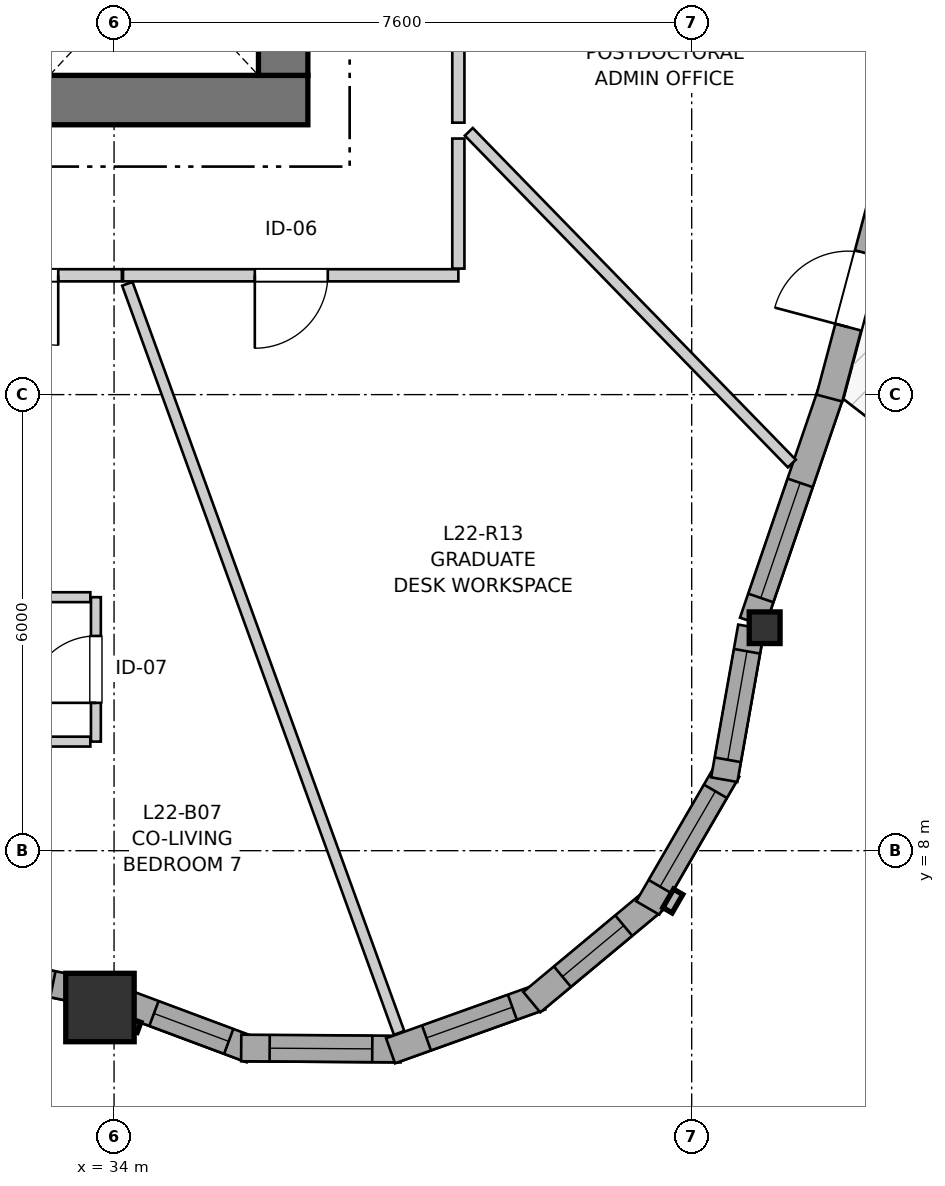
"""IFC4 building model, lengths in metres.
Left out: names, types, materials, properties, quantities, classifications, styles, units other than length and angle.
Written with IfcOpenShell. Run it as: python <this file> out.ifc"""

import sys

from ifc_helpers import new_model, si_unit, direction, frame, frame_2d, origin, origin_2d, place, context, subcontext, project, spatial, rectangle, i_section, extrude, source, transform, mapped, element, fill, save


model = new_model("IFC4")
c1 = context("Model", 3, precision=1e-05, world=origin(), true_north=direction((0.0, 1.0)))
c2 = subcontext(c1, "Body", "Model", "MODEL_VIEW")
j1 = project(units=[si_unit("LENGTHUNIT", "METRE"), si_unit("PLANEANGLEUNIT", "RADIAN")], contexts=[c1])
p1 = place(None, origin())
s1 = spatial("IfcSite", under=j1, at=p1, CompositionType="ELEMENT")
p2 = place(p1, origin())
s2 = spatial("IfcBuilding", under=s1, at=p2, CompositionType="ELEMENT")
p3 = place(p2, frame((0.0, 0.0, 76.8)))
s3 = spatial("IfcBuildingStorey", under=s2, at=p3, CompositionType="ELEMENT", Elevation=76.8)
p4 = place(p3, frame((24.15, 17.875, 0.0), z_axis=(0.0, 0.0, 1.0), x_axis=(1.0, 0.0, 0.0)))
e1 = element("IfcWall", 1, at=p4, inside=s3, PredefinedType="SHEAR", context=c2, shape_type="SweptSolid", body=[
    extrude(rectangle(XDim=12.4, YDim=0.65, at=frame_2d((6.2, 0.0))), origin(), (0.0, 0.0, 1.0), 2.935),
])
p5 = place(p3, frame((36.225, 18.2, 0.0), z_axis=(0.0, 0.0, 1.0), x_axis=(0.0, 1.0, 0.0)))
e2 = element("IfcWall", 2, at=p5, inside=s3, PredefinedType="SHEAR", context=c2, shape_type="SweptSolid", body=[
    extrude(rectangle(XDim=15.6, YDim=0.65, at=frame_2d((7.8, 0.0))), origin(), (0.0, 0.0, 1.0), 2.935),
])
p6 = place(p5, frame((4.25, 0.0, 0.0)))
e3 = element("IfcOpeningElement", 3, at=p6, cuts=e2, PredefinedType="OPENING", context=c2, shape_type="SweptSolid", body=[
    extrude(rectangle(XDim=1.1, YDim=2.15, at=frame_2d((0.55, 1.075))), frame((0.0, 0.335, 0.0), z_axis=(0.0, -1.0, 0.0), x_axis=(1.0, 0.0, 0.0)), (0.0, 0.0, 1.0), 0.67),
])
p7 = place(p5, frame((10.25, 0.0, 0.0)))
e4 = element("IfcOpeningElement", 4, at=p7, cuts=e2, PredefinedType="OPENING", context=c2, shape_type="SweptSolid", body=[
    extrude(rectangle(XDim=1.1, YDim=2.15, at=frame_2d((0.55, 1.075))), frame((0.0, 0.335, 0.0), z_axis=(0.0, -1.0, 0.0), x_axis=(1.0, 0.0, 0.0)), (0.0, 0.0, 1.0), 0.67),
])
m1 = source(origin(), c2, "Body", "SweptSolid", [
    extrude(rectangle(XDim=0.9, YDim=0.9, at=origin_2d()), origin(), (0.0, 0.0, 1.0), 2.935),
])
p8 = place(p3, frame((33.815, 5.937, 0.0), z_axis=(0.0, 0.0, 1.0), x_axis=(1.0, 0.0, 0.0)))
e5 = element("IfcColumn", 5, at=p8, inside=s3, PredefinedType="COLUMN", context=c2, shape_type="MappedRepresentation", body=[
    mapped(m1, transform((0.0, 0.0, 0.0), x_axis=(1.0, 0.0, 0.0), y_axis=(0.0, 1.0, 0.0), z_axis=(0.0, 0.0, 1.0), scale=1.0)),
])
m2 = source(origin(), c2, "Body", "SweptSolid", [
    extrude(i_section(OverallWidth=0.406, OverallDepth=0.416, WebThickness=0.027, FlangeThickness=0.044, FilletRadius=0.015, at=origin_2d()), origin(), (0.0, 0.0, 1.0), 2.935),
])
p9 = place(p3, frame((42.56, 10.933, 0.0), z_axis=(0.0, 0.0, 1.0), x_axis=(1.0, 0.0, 0.0)))
e6 = element("IfcColumn", 6, at=p9, inside=s3, PredefinedType="PILASTER", context=c2, shape_type="MappedRepresentation", body=[
    mapped(m2, transform((0.0, 0.0, 0.0), x_axis=(1.0, 0.0, 0.0), y_axis=(0.0, 1.0, 0.0), z_axis=(0.0, 0.0, 1.0), scale=1.0)),
])
p10 = place(p3, frame((30.741, 6.748, 0.0), z_axis=(0.0, 0.0, 1.0), x_axis=(0.979446941056, -0.201701982282, 0.0)))
e7 = element("IfcWall", 7, at=p10, inside=s3, PredefinedType="SOLIDWALL", context=c2, shape_type="SweptSolid", body=[
    extrude(rectangle(XDim=2.948, YDim=0.35, at=frame_2d((1.474, 0.0))), origin(), (0.0, 0.0, 1.0), 2.465),
])
p11 = place(p10, frame((0.27, 0.0, 0.82)))
e8 = element("IfcOpeningElement", 8, at=p11, cuts=e7, PredefinedType="OPENING", context=c2, shape_type="SweptSolid", body=[
    extrude(rectangle(XDim=1.25, YDim=1.35, at=frame_2d((0.625, 0.675))), frame((0.0, 0.185, 0.0), z_axis=(0.0, -1.0, 0.0), x_axis=(1.0, 0.0, 0.0)), (0.0, 0.0, 1.0), 0.37),
])
p12 = place(p10, frame((1.925, 0.0, 0.82)))
e9 = element("IfcOpeningElement", 9, at=p12, cuts=e7, PredefinedType="OPENING", context=c2, shape_type="SweptSolid", body=[
    extrude(rectangle(XDim=0.58, YDim=1.35, at=frame_2d((0.29, 0.675))), frame((0.0, 0.185, 0.0), z_axis=(0.0, -1.0, 0.0), x_axis=(1.0, 0.0, 0.0)), (0.0, 0.0, 1.0), 0.37),
])
p13 = place(p3, frame((34.087, 6.022, 0.0), z_axis=(0.0, 0.0, 1.0), x_axis=(0.9368310555, -0.349782180007, 0.0)))
e10 = element("IfcWall", 10, at=p13, inside=s3, PredefinedType="SOLIDWALL", context=c2, shape_type="SweptSolid", body=[
    extrude(rectangle(XDim=1.836, YDim=0.35, at=frame_2d((0.918, 0.0))), origin(), (0.0, 0.0, 1.0), 2.465),
])
p14 = place(p13, frame((0.468, 0.0, 0.82)))
e11 = element("IfcOpeningElement", 11, at=p14, cuts=e10, PredefinedType="OPENING", context=c2, shape_type="SweptSolid", body=[
    extrude(rectangle(XDim=1.05, YDim=1.45, at=frame_2d((0.525, 0.725))), frame((0.0, 0.185, 0.0), z_axis=(0.0, -1.0, 0.0), x_axis=(1.0, 0.0, 0.0)), (0.0, 0.0, 1.0), 0.37),
])
p15 = place(p3, frame((35.673, 5.404, 0.0), z_axis=(0.0, 0.0, 1.0), x_axis=(0.999976451414, -0.006862697526, 0.0)))
e12 = element("IfcWall", 12, at=p15, inside=s3, PredefinedType="SOLIDWALL", context=c2, shape_type="SweptSolid", body=[
    extrude(rectangle(XDim=2.099, YDim=0.35, at=frame_2d((1.049, 0.0))), origin(), (0.0, 0.0, 1.0), 2.465),
])
p16 = place(p15, frame((0.375, 0.0, 0.82)))
e13 = element("IfcOpeningElement", 13, at=p16, cuts=e12, PredefinedType="OPENING", context=c2, shape_type="SweptSolid", body=[
    extrude(rectangle(XDim=1.35, YDim=1.45, at=frame_2d((0.675, 0.725))), frame((0.0, 0.185, 0.0), z_axis=(0.0, -1.0, 0.0), x_axis=(1.0, 0.0, 0.0)), (0.0, 0.0, 1.0), 0.37),
])
p17 = place(p3, frame((37.638, 5.367, 0.0), z_axis=(0.0, 0.0, 1.0), x_axis=(0.941486401639, 0.33705096874, 0.0)))
e14 = element("IfcWall", 14, at=p17, inside=s3, PredefinedType="SOLIDWALL", context=c2, shape_type="SweptSolid", body=[
    extrude(rectangle(XDim=2.099, YDim=0.35, at=frame_2d((1.05, 0.0))), origin(), (0.0, 0.0, 1.0), 2.465),
])
p18 = place(p17, frame((0.502, 0.0, 0.82)))
e15 = element("IfcOpeningElement", 15, at=p18, cuts=e14, PredefinedType="OPENING", context=c2, shape_type="SweptSolid", body=[
    extrude(rectangle(XDim=1.2, YDim=1.45, at=frame_2d((0.6, 0.725))), frame((0.0, 0.185, 0.0), z_axis=(0.0, -1.0, 0.0), x_axis=(1.0, 0.0, 0.0)), (0.0, 0.0, 1.0), 0.37),
])
p19 = place(p3, frame((39.496, 6.007, 0.0), z_axis=(0.0, 0.0, 1.0), x_axis=(0.768450068703, 0.639909752942, 0.0)))
e16 = element("IfcWall", 16, at=p19, inside=s3, PredefinedType="SOLIDWALL", context=c2, shape_type="SweptSolid", body=[
    extrude(rectangle(XDim=2.099, YDim=0.35, at=frame_2d((1.049, 0.0))), origin(), (0.0, 0.0, 1.0), 2.465),
])
p20 = place(p19, frame((0.524, 0.0, 0.82)))
e17 = element("IfcOpeningElement", 17, at=p20, cuts=e16, PredefinedType="OPENING", context=c2, shape_type="SweptSolid", body=[
    extrude(rectangle(XDim=1.05, YDim=1.45, at=frame_2d((0.525, 0.725))), frame((0.0, 0.185, 0.0), z_axis=(0.0, -1.0, 0.0), x_axis=(1.0, 0.0, 0.0)), (0.0, 0.0, 1.0), 0.37),
])
p21 = place(p3, frame((41.021, 7.247, 0.0), z_axis=(0.0, 0.0, 1.0), x_axis=(0.501902596059, 0.864924149315, 0.0)))
e18 = element("IfcWall", 18, at=p21, inside=s3, PredefinedType="SOLIDWALL", context=c2, shape_type="SweptSolid", body=[
    extrude(rectangle(XDim=2.099, YDim=0.35, at=frame_2d((1.049, 0.0))), origin(), (0.0, 0.0, 1.0), 2.465),
])
p22 = place(p21, frame((0.324, 0.0, 0.82)))
e19 = element("IfcOpeningElement", 19, at=p22, cuts=e18, PredefinedType="OPENING", context=c2, shape_type="SweptSolid", body=[
    extrude(rectangle(XDim=1.45, YDim=1.25, at=frame_2d((0.725, 0.625))), frame((0.0, 0.185, 0.0), z_axis=(0.0, -1.0, 0.0), x_axis=(1.0, 0.0, 0.0)), (0.0, 0.0, 1.0), 0.37),
])
p23 = place(p3, frame((42.028, 8.934, 0.0), z_axis=(0.0, 0.0, 1.0), x_axis=(0.174399433509, 0.984674990843, 0.0)))
e20 = element("IfcWall", 20, at=p23, inside=s3, PredefinedType="SOLIDWALL", context=c2, shape_type="SweptSolid", body=[
    extrude(rectangle(XDim=2.041, YDim=0.35, at=frame_2d((1.021, 0.0))), origin(), (0.0, 0.0, 1.0), 2.465),
])
p24 = place(p23, frame((0.265, 0.0, 0.82)))
e21 = element("IfcOpeningElement", 21, at=p24, cuts=e20, PredefinedType="OPENING", context=c2, shape_type="SweptSolid", body=[
    extrude(rectangle(XDim=1.45, YDim=1.25, at=frame_2d((0.725, 0.625))), frame((0.0, 0.185, 0.0), z_axis=(0.0, -1.0, 0.0), x_axis=(1.0, 0.0, 0.0)), (0.0, 0.0, 1.0), 0.37),
])
p25 = place(p3, frame((42.401, 11.009, 0.0), z_axis=(0.0, 0.0, 1.0), x_axis=(0.323605065536, 0.946192243447, 0.0)))
e22 = element("IfcWall", 22, at=p25, inside=s3, PredefinedType="SOLIDWALL", context=c2, shape_type="SweptSolid", body=[
    extrude(rectangle(XDim=3.203, YDim=0.35, at=frame_2d((1.601, 0.0))), origin(), (0.0, 0.0, 1.0), 2.465),
])
p26 = place(p25, frame((0.334, 0.0, 0.82)))
e23 = element("IfcOpeningElement", 23, at=p26, cuts=e22, PredefinedType="OPENING", context=c2, shape_type="SweptSolid", body=[
    extrude(rectangle(XDim=1.6, YDim=1.35, at=frame_2d((0.8, 0.675))), frame((0.0, 0.185, 0.0), z_axis=(0.0, -1.0, 0.0), x_axis=(1.0, 0.0, 0.0)), (0.0, 0.0, 1.0), 0.37),
])
p27 = place(p3, frame((43.412, 13.955, 0.0), z_axis=(0.0, 0.0, 1.0), x_axis=(0.257050841376, 0.966397881283, 0.0)))
e24 = element("IfcWall", 24, at=p27, inside=s3, PredefinedType="SOLIDWALL", context=c2, shape_type="SweptSolid", body=[
    extrude(rectangle(XDim=2.931, YDim=0.35, at=frame_2d((1.465, 0.0))), origin(), (0.0, 0.0, 1.0), 2.465),
])
p28 = place(p27, frame((0.966, 0.0, 0.0)))
e25 = element("IfcOpeningElement", 25, at=p28, cuts=e24, PredefinedType="OPENING", context=c2, shape_type="SweptSolid", body=[
    extrude(rectangle(XDim=1.0, YDim=2.1, at=frame_2d((0.5, 1.05))), frame((0.0, 0.185, 0.0), z_axis=(0.0, -1.0, 0.0), x_axis=(1.0, 0.0, 0.0)), (0.0, 0.0, 1.0), 0.37),
])
p29 = place(p3, frame((38.53, 24.781, 0.0), z_axis=(0.0, 0.0, 1.0), x_axis=(0.0, -1.0, 0.0)))
e26 = element("IfcWall", 26, at=p29, inside=s3, PredefinedType="PARTITIONING", context=c2, shape_type="SweptSolid", body=[
    extrude(rectangle(XDim=7.203, YDim=0.16, at=frame_2d((3.602, 0.0))), origin(), (0.0, 0.0, 1.0), 2.935),
])
p30 = place(p29, frame((3.119, 0.0, 0.0)))
e27 = element("IfcOpeningElement", 27, at=p30, cuts=e26, PredefinedType="OPENING", context=c2, shape_type="SweptSolid", body=[
    extrude(rectangle(XDim=0.96, YDim=2.1, at=frame_2d((0.48, 1.05))), frame((0.0, 0.09, 0.0), z_axis=(0.0, -1.0, 0.0), x_axis=(1.0, 0.0, 0.0)), (0.0, 0.0, 1.0), 0.18),
])
p31 = place(p3, frame((38.53, 15.57, 0.0), z_axis=(0.0, 0.0, 1.0), x_axis=(-1.0, 0.0, 0.0)))
e28 = element("IfcWall", 28, at=p31, inside=s3, PredefinedType="PARTITIONING", context=c2, shape_type="SweptSolid", body=[
    extrude(rectangle(XDim=4.412, YDim=0.16, at=frame_2d((2.206, 0.0))), origin(), (0.0, 0.0, 1.0), 2.935),
])
p32 = place(p31, frame((1.718, 0.0, 0.0)))
e29 = element("IfcOpeningElement", 29, at=p32, cuts=e28, PredefinedType="OPENING", context=c2, shape_type="SweptSolid", body=[
    extrude(rectangle(XDim=0.96, YDim=2.1, at=frame_2d((0.48, 1.05))), frame((0.0, 0.09, 0.0), z_axis=(0.0, -1.0, 0.0), x_axis=(1.0, 0.0, 0.0)), (0.0, 0.0, 1.0), 0.18),
])
p33 = place(p3, frame((34.103, 15.57, 0.0), z_axis=(0.0, 0.0, 1.0), x_axis=(-1.0, 0.0, 0.0)))
e30 = element("IfcWall", 30, at=p33, inside=s3, PredefinedType="PARTITIONING", context=c2, shape_type="SweptSolid", body=[
    extrude(rectangle(XDim=2.596, YDim=0.16, at=frame_2d((1.298, 0.0))), origin(), (0.0, 0.0, 1.0), 2.935),
])
p34 = place(p33, frame((0.837, 0.0, 0.0)))
e31 = element("IfcOpeningElement", 31, at=p34, cuts=e30, PredefinedType="OPENING", context=c2, shape_type="SweptSolid", body=[
    extrude(rectangle(XDim=0.92, YDim=2.1, at=frame_2d((0.46, 1.05))), frame((0.0, 0.09, 0.0), z_axis=(0.0, -1.0, 0.0), x_axis=(1.0, 0.0, 0.0)), (0.0, 0.0, 1.0), 0.18),
])
p35 = place(p3, frame((33.761, 9.435, 0.0), z_axis=(0.0, 0.0, 1.0), x_axis=(0.0, 1.0, 0.0)))
e32 = element("IfcWall", 32, at=p35, inside=s3, PredefinedType="PARTITIONING", context=c2, shape_type="SweptSolid", body=[
    extrude(rectangle(XDim=1.9, YDim=0.13, at=frame_2d((0.95, 0.0))), origin(), (0.0, 0.0, 1.0), 2.935),
])
p36 = place(p35, frame((0.51, 0.0, 0.0)))
e33 = element("IfcOpeningElement", 33, at=p36, cuts=e32, PredefinedType="OPENING", context=c2, shape_type="SweptSolid", body=[
    extrude(rectangle(XDim=0.88, YDim=2.05, at=frame_2d((0.44, 1.025))), frame((0.0, 0.075, 0.0), z_axis=(0.0, -1.0, 0.0), x_axis=(1.0, 0.0, 0.0)), (0.0, 0.0, 1.0), 0.15),
])
p37 = place(p3, frame((34.175, 15.458, 0.0), z_axis=(0.0, 0.0, 1.0), x_axis=(0.341079223998, -0.940034554129, 0.0)))
e34 = element("IfcWall", 34, at=p37, inside=s3, PredefinedType="PARTITIONING", context=c2, shape_type="SweptSolid", body=[
    extrude(rectangle(XDim=10.484, YDim=0.145, at=frame_2d((5.242, 0.0))), origin(), (0.0, 0.0, 1.0), 2.935),
])
p38 = place(p3, frame((38.667, 17.458, 0.0), z_axis=(0.0, 0.0, 1.0), x_axis=(0.697626427609, -0.716461699954, 0.0)))
e35 = element("IfcWall", 35, at=p38, inside=s3, PredefinedType="PARTITIONING", context=c2, shape_type="SweptSolid", body=[
    extrude(rectangle(XDim=6.092, YDim=0.145, at=frame_2d((3.046, 0.0))), origin(), (0.0, 0.0, 1.0), 2.935),
])
p39 = place(p3, frame((38.53, 15.658, 0.0), z_axis=(0.0, 0.0, 1.0), x_axis=(0.0, 1.0, 0.0)))
e36 = element("IfcWall", 36, at=p39, inside=s3, PredefinedType="PARTITIONING", context=c2, shape_type="SweptSolid", body=[
    extrude(rectangle(XDim=1.711, YDim=0.16, at=frame_2d((0.855, 0.0))), origin(), (0.0, 0.0, 1.0), 2.935),
])
p40 = place(p3, frame((32.049, 11.335, 0.0), z_axis=(0.0, 0.0, 1.0), x_axis=(1.0, 0.0, 0.0)))
e37 = element("IfcWall", 37, at=p40, inside=s3, PredefinedType="PARTITIONING", context=c2, shape_type="SweptSolid", body=[
    extrude(rectangle(XDim=1.639, YDim=0.13, at=frame_2d((0.82, 0.0))), origin(), (0.0, 0.0, 1.0), 2.935),
])
p41 = place(p3, frame((32.228, 9.435, 0.0), z_axis=(0.0, 0.0, 1.0), x_axis=(1.0, 0.0, 0.0)))
e38 = element("IfcWall", 38, at=p41, inside=s3, PredefinedType="PARTITIONING", context=c2, shape_type="SweptSolid", body=[
    extrude(rectangle(XDim=1.46, YDim=0.13, at=frame_2d((0.73, 0.0))), origin(), (0.0, 0.0, 1.0), 2.935),
])
m3 = source(origin(), c2, "Body", "SweptSolid", [
    extrude(rectangle(XDim=0.58, YDim=1.35, at=frame_2d((0.29, 0.675))), frame((0.0, 0.03, 0.0), z_axis=(0.0, -1.0, 0.0), x_axis=(1.0, 0.0, 0.0)), (0.0, 0.0, 1.0), 0.06),
])
p42 = place(p12, origin())
e39 = element("IfcWindow", 39, at=p42, inside=s3, PartitioningType="SINGLE_PANEL", PredefinedType="WINDOW", context=c2, shape_type="MappedRepresentation", body=[
    mapped(m3, transform((0.0, 0.0, 0.0), x_axis=(1.0, 0.0, 0.0), y_axis=(0.0, 1.0, 0.0), z_axis=(0.0, 0.0, 1.0), scale=1.0)),
])
fill(e9, e39)
m4 = source(origin(), c2, "Body", "SweptSolid", [
    extrude(rectangle(XDim=1.05, YDim=1.45, at=frame_2d((0.525, 0.725))), frame((0.0, 0.03, 0.0), z_axis=(0.0, -1.0, 0.0), x_axis=(1.0, 0.0, 0.0)), (0.0, 0.0, 1.0), 0.06),
])
p43 = place(p14, origin())
e40 = element("IfcWindow", 40, at=p43, inside=s3, PartitioningType="SINGLE_PANEL", PredefinedType="WINDOW", context=c2, shape_type="MappedRepresentation", body=[
    mapped(m4, transform((0.0, 0.0, 0.0), x_axis=(1.0, 0.0, 0.0), y_axis=(0.0, 1.0, 0.0), z_axis=(0.0, 0.0, 1.0), scale=1.0)),
])
fill(e11, e40)
m5 = source(origin(), c2, "Body", "SweptSolid", [
    extrude(rectangle(XDim=1.35, YDim=1.45, at=frame_2d((0.675, 0.725))), frame((0.0, 0.03, 0.0), z_axis=(0.0, -1.0, 0.0), x_axis=(1.0, 0.0, 0.0)), (0.0, 0.0, 1.0), 0.06),
])
p44 = place(p16, origin())
e41 = element("IfcWindow", 41, at=p44, inside=s3, PartitioningType="SINGLE_PANEL", PredefinedType="WINDOW", context=c2, shape_type="MappedRepresentation", body=[
    mapped(m5, transform((0.0, 0.0, 0.0), x_axis=(1.0, 0.0, 0.0), y_axis=(0.0, 1.0, 0.0), z_axis=(0.0, 0.0, 1.0), scale=1.0)),
])
fill(e13, e41)
m6 = source(origin(), c2, "Body", "SweptSolid", [
    extrude(rectangle(XDim=1.2, YDim=1.45, at=frame_2d((0.6, 0.725))), frame((0.0, 0.03, 0.0), z_axis=(0.0, -1.0, 0.0), x_axis=(1.0, 0.0, 0.0)), (0.0, 0.0, 1.0), 0.06),
])
p45 = place(p18, origin())
e42 = element("IfcWindow", 42, at=p45, inside=s3, PartitioningType="SINGLE_PANEL", PredefinedType="WINDOW", context=c2, shape_type="MappedRepresentation", body=[
    mapped(m6, transform((0.0, 0.0, 0.0), x_axis=(1.0, 0.0, 0.0), y_axis=(0.0, 1.0, 0.0), z_axis=(0.0, 0.0, 1.0), scale=1.0)),
])
fill(e15, e42)
p46 = place(p20, origin())
e43 = element("IfcWindow", 43, at=p46, inside=s3, PartitioningType="SINGLE_PANEL", PredefinedType="WINDOW", context=c2, shape_type="MappedRepresentation", body=[
    mapped(m4, transform((0.0, 0.0, 0.0), x_axis=(1.0, 0.0, 0.0), y_axis=(0.0, 1.0, 0.0), z_axis=(0.0, 0.0, 1.0), scale=1.0)),
])
fill(e17, e43)
m7 = source(origin(), c2, "Body", "SweptSolid", [
    extrude(rectangle(XDim=1.45, YDim=1.25, at=frame_2d((0.725, 0.625))), frame((0.0, 0.03, 0.0), z_axis=(0.0, -1.0, 0.0), x_axis=(1.0, 0.0, 0.0)), (0.0, 0.0, 1.0), 0.06),
])
p47 = place(p22, origin())
e44 = element("IfcWindow", 44, at=p47, inside=s3, PartitioningType="SINGLE_PANEL", PredefinedType="WINDOW", context=c2, shape_type="MappedRepresentation", body=[
    mapped(m7, transform((0.0, 0.0, 0.0), x_axis=(1.0, 0.0, 0.0), y_axis=(0.0, 1.0, 0.0), z_axis=(0.0, 0.0, 1.0), scale=1.0)),
])
fill(e19, e44)
p48 = place(p24, origin())
e45 = element("IfcWindow", 45, at=p48, inside=s3, PartitioningType="SINGLE_PANEL", PredefinedType="WINDOW", context=c2, shape_type="MappedRepresentation", body=[
    mapped(m7, transform((0.0, 0.0, 0.0), x_axis=(1.0, 0.0, 0.0), y_axis=(0.0, 1.0, 0.0), z_axis=(0.0, 0.0, 1.0), scale=1.0)),
])
fill(e21, e45)
m8 = source(origin(), c2, "Body", "SweptSolid", [
    extrude(rectangle(XDim=1.6, YDim=1.35, at=frame_2d((0.8, 0.675))), frame((0.0, 0.03, 0.0), z_axis=(0.0, -1.0, 0.0), x_axis=(1.0, 0.0, 0.0)), (0.0, 0.0, 1.0), 0.06),
])
p49 = place(p26, origin())
e46 = element("IfcWindow", 46, at=p49, inside=s3, PartitioningType="SINGLE_PANEL", PredefinedType="WINDOW", context=c2, shape_type="MappedRepresentation", body=[
    mapped(m8, transform((0.0, 0.0, 0.0), x_axis=(1.0, 0.0, 0.0), y_axis=(0.0, 1.0, 0.0), z_axis=(0.0, 0.0, 1.0), scale=1.0)),
])
fill(e23, e46)
m9 = source(origin(), c2, "Body", "SweptSolid", [
    extrude(rectangle(XDim=1.0, YDim=2.1, at=frame_2d((0.5, 1.05))), frame((0.0, 0.025, 0.0), z_axis=(0.0, -1.0, 0.0), x_axis=(1.0, 0.0, 0.0)), (0.0, 0.0, 1.0), 0.05),
])
p50 = place(p28, origin())
e47 = element("IfcDoor", 47, at=p50, inside=s3, OperationType="SINGLE_SWING_LEFT", PredefinedType="DOOR", context=c2, shape_type="MappedRepresentation", body=[
    mapped(m9, transform((0.0, 0.0, 0.0), x_axis=(1.0, 0.0, 0.0), y_axis=(0.0, 1.0, 0.0), z_axis=(0.0, 0.0, 1.0), scale=1.0)),
])
fill(e25, e47)
m10 = source(origin(), c2, "Body", "SweptSolid", [
    extrude(rectangle(XDim=0.96, YDim=2.1, at=frame_2d((0.48, 1.05))), frame((0.0, 0.025, 0.0), z_axis=(0.0, -1.0, 0.0), x_axis=(1.0, 0.0, 0.0)), (0.0, 0.0, 1.0), 0.05),
])
p51 = place(p32, origin())
e48 = element("IfcDoor", 48, at=p51, inside=s3, OperationType="SINGLE_SWING_RIGHT", PredefinedType="DOOR", context=c2, shape_type="MappedRepresentation", body=[
    mapped(m10, transform((0.0, 0.0, 0.0), x_axis=(1.0, 0.0, 0.0), y_axis=(0.0, 1.0, 0.0), z_axis=(0.0, 0.0, 1.0), scale=1.0)),
])
fill(e29, e48)
m11 = source(origin(), c2, "Body", "SweptSolid", [
    extrude(rectangle(XDim=0.92, YDim=2.1, at=frame_2d((0.46, 1.05))), frame((0.0, 0.025, 0.0), z_axis=(0.0, -1.0, 0.0), x_axis=(1.0, 0.0, 0.0)), (0.0, 0.0, 1.0), 0.05),
])
p52 = place(p34, origin())
e49 = element("IfcDoor", 49, at=p52, inside=s3, OperationType="SINGLE_SWING_LEFT", PredefinedType="DOOR", context=c2, shape_type="MappedRepresentation", body=[
    mapped(m11, transform((0.0, 0.0, 0.0), x_axis=(1.0, 0.0, 0.0), y_axis=(0.0, 1.0, 0.0), z_axis=(0.0, 0.0, 1.0), scale=1.0)),
])
fill(e31, e49)
m12 = source(origin(), c2, "Body", "SweptSolid", [
    extrude(rectangle(XDim=0.88, YDim=2.05, at=frame_2d((0.44, 1.025))), frame((0.0, 0.025, 0.0), z_axis=(0.0, -1.0, 0.0), x_axis=(1.0, 0.0, 0.0)), (0.0, 0.0, 1.0), 0.05),
])
p53 = place(p36, origin())
e50 = element("IfcDoor", 50, at=p53, inside=s3, OperationType="SINGLE_SWING_LEFT", PredefinedType="DOOR", context=c2, shape_type="MappedRepresentation", body=[
    mapped(m12, transform((0.0, 0.0, 0.0), x_axis=(1.0, 0.0, 0.0), y_axis=(0.0, 1.0, 0.0), z_axis=(0.0, 0.0, 1.0), scale=1.0)),
])
fill(e33, e50)
save(model, sys.argv[1])
